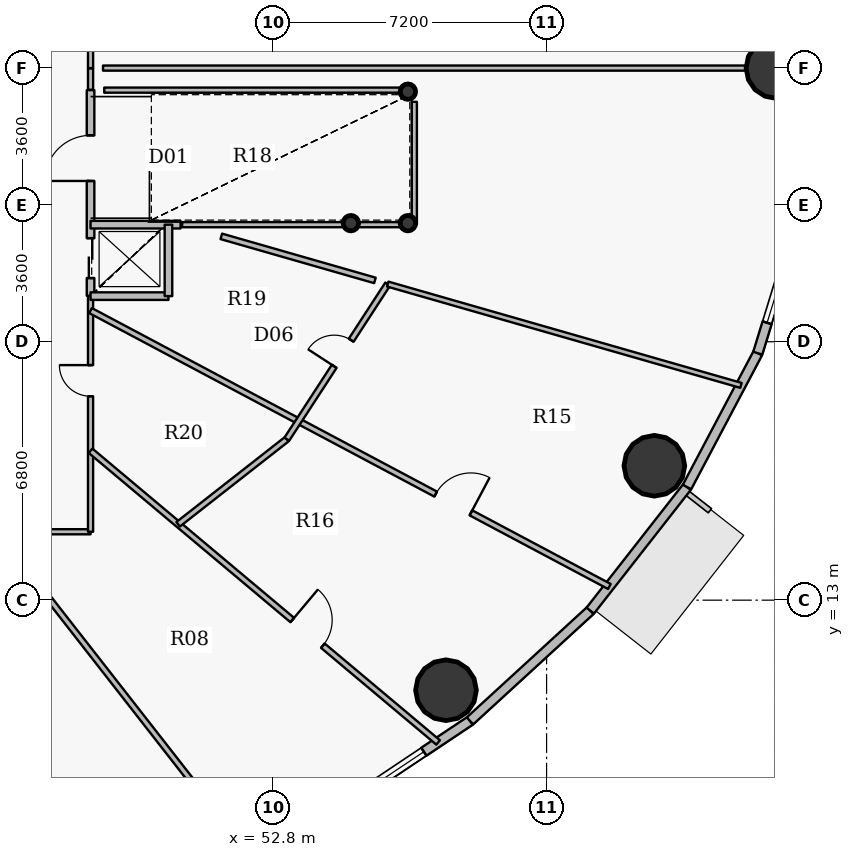
"""IFC4 building model, lengths in metres.
Left out: names, types, materials, properties, quantities, classifications, styles, units other than length and angle.
Written with IfcOpenShell. Run it as: python <this file> out.ifc"""

import sys

from ifc_helpers import new_model, si_unit, direction, frame, frame_2d, origin, origin_2d, place, context, subcontext, project, spatial, rectangle, hollow_circle, extrude, source, transform, mapped, element, fill, save


model = new_model("IFC4")
c1 = context("Model", 3, precision=1e-05, world=origin(), true_north=direction((0.0, 1.0)))
c2 = subcontext(c1, "Body", "Model", "MODEL_VIEW")
j1 = project(units=[si_unit("LENGTHUNIT", "METRE"), si_unit("PLANEANGLEUNIT", "RADIAN")], contexts=[c1])
p1 = place(None, origin())
s1 = spatial("IfcSite", under=j1, at=p1, CompositionType="ELEMENT")
p2 = place(p1, origin())
s2 = spatial("IfcBuilding", under=s1, at=p2, CompositionType="ELEMENT")
p3 = place(p2, frame((0.0, 0.0, 57.6)))
s3 = spatial("IfcBuildingStorey", under=s2, at=p3, CompositionType="ELEMENT", Elevation=57.6)
for number, where, z_axis, x_axis in (
    (1, (56.35, 26.38, 0.0), (0.0, 0.0, 1.0), (1.0, 0.0, 0.0)),
    (2, (56.35, 22.92, 0.0), (0.0, 0.0, 1.0), (1.0, 0.0, 0.0)),
    (3, (54.85, 22.92, 0.0), (0.0, 0.0, 1.0), (1.0, 0.0, 0.0)),
):
    element("IfcColumn", number, at=place(p3, frame(where, z_axis=z_axis, x_axis=x_axis)), inside=s3, PredefinedType="COLUMN", context=c2, shape_type="SweptSolid", body=[
        extrude(hollow_circle(Radius=0.203, WallThickness=0.016, at=origin_2d()), origin(), (0.0, 0.0, 1.0), 4.2),
    ])
for number, where, z_axis, x_axis in (
    (4, (66.05, 27.0, 0.0), (0.0, 0.0, 1.0), (1.0, 0.0, 0.0)),
    (5, (57.353, 10.631, 0.0), (0.0, 0.0, 1.0), (1.0, 0.0, 0.0)),
    (6, (62.835, 16.536, 0.0), (0.0, 0.0, 1.0), (1.0, 0.0, 0.0)),
):
    element("IfcColumn", number, at=place(p3, frame(where, z_axis=z_axis, x_axis=x_axis)), inside=s3, PredefinedType="COLUMN", context=c2, shape_type="SweptSolid", body=[
        extrude(hollow_circle(Radius=0.8, WallThickness=0.045, at=origin_2d()), origin(), (0.0, 0.0, 1.0), 4.2),
    ])
p4 = place(p3, frame((57.985, 9.824, 0.0), z_axis=(0.0, 0.0, 1.0), x_axis=(-0.831240982525, -0.555912249343, 0.0)))
e7 = element("IfcWall", 7, at=p4, inside=s3, PredefinedType="SOLIDWALL", context=c2, shape_type="SweptSolid", body=[
    extrude(rectangle(XDim=4.46, YDim=0.25, at=frame_2d((2.23, 0.0))), origin(), (0.0, 0.0, 1.0), 3.95),
])
p5 = place(p4, frame((1.461, 0.0, 0.9)))
e8 = element("IfcOpeningElement", 8, at=p5, cuts=e7, PredefinedType="OPENING", context=c2, shape_type="SweptSolid", body=[
    extrude(rectangle(XDim=2.2, YDim=2.0, at=origin_2d()), frame((1.1, 0.135, 1.0), z_axis=(0.0, -1.0, 0.0), x_axis=(1.0, 0.0, 0.0)), (0.0, 0.0, 1.0), 0.27),
])
p6 = place(p3, frame((61.15, 12.725, 0.0), z_axis=(0.0, 0.0, 1.0), x_axis=(-0.737116376281, -0.67576582321, 0.0)))
e9 = element("IfcWall", 9, at=p6, inside=s3, PredefinedType="SOLIDWALL", context=c2, shape_type="SweptSolid", body=[
    extrude(rectangle(XDim=4.294, YDim=0.25, at=frame_2d((2.147, 0.0))), origin(), (0.0, 0.0, 1.0), 3.95),
])
p7 = place(p3, frame((63.695, 15.977, 0.0), z_axis=(0.0, 0.0, 1.0), x_axis=(-0.616295508253, -0.787514981767, 0.0)))
e10 = element("IfcWall", 10, at=p7, inside=s3, PredefinedType="SOLIDWALL", context=c2, shape_type="SweptSolid", body=[
    extrude(rectangle(XDim=4.129, YDim=0.25, at=frame_2d((2.065, 0.0))), origin(), (0.0, 0.0, 1.0), 3.95),
])
p8 = place(p3, frame((65.558, 19.499, 0.0), z_axis=(0.0, 0.0, 1.0), x_axis=(-0.467662443071, -0.883907144072, 0.0)))
e11 = element("IfcWall", 11, at=p8, inside=s3, PredefinedType="SOLIDWALL", context=c2, shape_type="SweptSolid", body=[
    extrude(rectangle(XDim=3.984, YDim=0.25, at=frame_2d((1.992, 0.0))), origin(), (0.0, 0.0, 1.0), 3.95),
])
p9 = place(p3, frame((66.693, 23.203, 0.0), z_axis=(0.0, 0.0, 1.0), x_axis=(-0.293111631758, -0.956078224482, 0.0)))
e12 = element("IfcWall", 12, at=p9, inside=s3, PredefinedType="SOLIDWALL", context=c2, shape_type="SweptSolid", body=[
    extrude(rectangle(XDim=3.875, YDim=0.25, at=frame_2d((1.938, 0.0))), origin(), (0.0, 0.0, 1.0), 3.95),
])
p10 = place(p9, frame((0.837, 0.0, 0.9)))
e13 = element("IfcOpeningElement", 13, at=p10, cuts=e12, PredefinedType="OPENING", context=c2, shape_type="SweptSolid", body=[
    extrude(rectangle(XDim=2.2, YDim=2.0, at=origin_2d()), frame((1.1, 0.135, 1.0), z_axis=(0.0, -1.0, 0.0), x_axis=(1.0, 0.0, 0.0)), (0.0, 0.0, 1.0), 0.27),
])
p11 = place(p3, frame((39.828, 19.8, 0.0), z_axis=(0.0, 0.0, 1.0), x_axis=(0.469475400737, -0.882945552174, 0.0)))
e14 = element("IfcWall", 14, at=p11, inside=s3, PredefinedType="MOVABLE", context=c2, shape_type="SweptSolid", body=[
    extrude(rectangle(XDim=17.188, YDim=0.11, at=frame_2d((8.594, 0.0))), origin(), (0.0, 0.0, 1.0), 3.335),
])
p12 = place(p11, frame((8.069, 0.0, 0.0)))
e15 = element("IfcOpeningElement", 15, at=p12, cuts=e14, PredefinedType="OPENING", context=c2, shape_type="SweptSolid", body=[
    extrude(rectangle(XDim=1.05, YDim=2.15, at=origin_2d()), frame((0.525, 0.065, 1.075), z_axis=(0.0, -1.0, 0.0), x_axis=(1.0, 0.0, 0.0)), (0.0, 0.0, 1.0), 0.13),
])
p13 = place(p3, frame((41.625, 19.8, 0.0), z_axis=(0.0, 0.0, 1.0), x_axis=(0.615654567116, -0.788016150843, 0.0)))
e16 = element("IfcWall", 16, at=p13, inside=s3, PredefinedType="PARTITIONING", context=c2, shape_type="SweptSolid", body=[
    extrude(rectangle(XDim=17.105, YDim=0.15, at=frame_2d((8.552, 0.0))), origin(), (0.0, 0.0, 1.0), 3.335),
])
p14 = place(p3, frame((46.05, 14.8, 0.0), z_axis=(0.0, 0.0, 1.0), x_axis=(1.0, 0.0, 0.0)))
e17 = element("IfcWall", 17, at=p14, inside=s3, PredefinedType="PARTITIONING", context=c2, shape_type="SweptSolid", body=[
    extrude(rectangle(XDim=1.95, YDim=0.135, at=frame_2d((0.975, 0.0))), origin(), (0.0, 0.0, 1.0), 3.95),
])
p15 = place(p3, frame((48.0, 14.8, 0.0), z_axis=(0.0, 0.0, 1.0), x_axis=(0.0, 1.0, 0.0)))
e18 = element("IfcWall", 18, at=p15, inside=s3, PredefinedType="PARTITIONING", context=c2, shape_type="SweptSolid", body=[
    extrude(rectangle(XDim=6.2, YDim=0.135, at=frame_2d((3.1, 0.0))), origin(), (0.0, 0.0, 1.0), 3.285),
])
p16 = place(p15, frame((3.565, 0.0, 0.0)))
e19 = element("IfcOpeningElement", 19, at=p16, cuts=e18, PredefinedType="OPENING", context=c2, shape_type="SweptSolid", body=[
    extrude(rectangle(XDim=0.82, YDim=2.1, at=origin_2d()), frame((0.41, 0.078, 1.05), z_axis=(0.0, -1.0, 0.0), x_axis=(1.0, 0.0, 0.0)), (0.0, 0.0, 1.0), 0.155),
])
p17 = place(p3, frame((48.0, 16.931, 0.0), z_axis=(0.0, 0.0, 1.0), x_axis=(0.766041142181, -0.642791543571, 0.0)))
e20 = element("IfcWall", 20, at=p17, inside=s3, PredefinedType="PARTITIONING", context=c2, shape_type="SweptSolid", body=[
    extrude(rectangle(XDim=11.939, YDim=0.15, at=frame_2d((5.969, 0.0))), origin(), (0.0, 0.0, 1.0), 3.335),
])
p18 = place(p17, frame((6.929, 0.0, 0.0)))
e21 = element("IfcOpeningElement", 21, at=p18, cuts=e20, PredefinedType="OPENING", context=c2, shape_type="SweptSolid", body=[
    extrude(rectangle(XDim=1.05, YDim=2.15, at=origin_2d()), frame((0.525, 0.085, 1.075), z_axis=(0.0, -1.0, 0.0), x_axis=(1.0, 0.0, 0.0)), (0.0, 0.0, 1.0), 0.17),
])
p19 = place(p3, frame((48.0, 20.619, 0.0), z_axis=(0.0, 0.0, 1.0), x_axis=(0.882949260716, -0.469468425989, 0.0)))
e22 = element("IfcWall", 22, at=p19, inside=s3, PredefinedType="PARTITIONING", context=c2, shape_type="SweptSolid", body=[
    extrude(rectangle(XDim=15.463, YDim=0.15, at=frame_2d((7.731, 0.0))), origin(), (0.0, 0.0, 1.0), 3.335),
])
p20 = place(p19, frame((10.285, 0.0, 0.0)))
e23 = element("IfcOpeningElement", 23, at=p20, cuts=e22, PredefinedType="OPENING", context=c2, shape_type="SweptSolid", body=[
    extrude(rectangle(XDim=1.05, YDim=2.15, at=origin_2d()), frame((0.525, 0.085, 1.075), z_axis=(0.0, -1.0, 0.0), x_axis=(1.0, 0.0, 0.0)), (0.0, 0.0, 1.0), 0.17),
])
p21 = place(p3, frame((48.0, 21.01, 0.0), z_axis=(0.0, 0.0, 1.0), x_axis=(0.0, 1.0, 0.0)))
e24 = element("IfcWall", 24, at=p21, inside=s3, PredefinedType="PARTITIONING", context=c2, shape_type="SweptSolid", body=[
    extrude(rectangle(XDim=5.41, YDim=0.2, at=frame_2d((2.705, 0.0))), origin(), (0.0, 0.0, 1.0), 3.285),
])
p22 = place(p21, frame((3.02, 0.0, 0.0)))
e25 = element("IfcOpeningElement", 25, at=p22, cuts=e24, PredefinedType="OPENING", context=c2, shape_type="SweptSolid", body=[
    extrude(rectangle(XDim=1.2, YDim=2.15, at=origin_2d()), frame((0.6, 0.11, 1.075), z_axis=(0.0, -1.0, 0.0), x_axis=(1.0, 0.0, 0.0)), (0.0, 0.0, 1.0), 0.22),
])
p23 = place(p21, frame((0.465, 0.0, 0.0)))
e26 = element("IfcOpeningElement", 26, at=p23, cuts=e24, PredefinedType="OPENING", context=c2, shape_type="SweptSolid", body=[
    extrude(rectangle(XDim=1.05, YDim=2.15, at=origin_2d()), frame((0.525, 0.11, 1.075), z_axis=(0.0, -1.0, 0.0), x_axis=(1.0, 0.0, 0.0)), (0.0, 0.0, 1.0), 0.22),
])
p24 = place(p3, frame((48.0, 21.0, 0.0), z_axis=(0.0, 0.0, 1.0), x_axis=(1.0, 0.0, 0.0)))
e27 = element("IfcWall", 27, at=p24, inside=s3, PredefinedType="PARTITIONING", context=c2, shape_type="SweptSolid", body=[
    extrude(rectangle(XDim=2.05, YDim=0.2, at=frame_2d((1.025, 0.0))), origin(), (0.0, 0.0, 1.0), 3.95),
])
p25 = place(p3, frame((48.0, 22.88, 0.0), z_axis=(0.0, 0.0, 1.0), x_axis=(1.0, 0.0, 0.0)))
e28 = element("IfcWall", 28, at=p25, inside=s3, PredefinedType="PARTITIONING", context=c2, shape_type="SweptSolid", body=[
    extrude(rectangle(XDim=2.368, YDim=0.2, at=frame_2d((1.184, 0.0))), origin(), (0.0, 0.0, 1.0), 3.95),
])
p26 = place(p3, frame((48.0, 27.0, 0.0), z_axis=(0.0, 0.0, 1.0), x_axis=(0.0, 1.0, 0.0)))
e29 = element("IfcWall", 29, at=p26, inside=s3, PredefinedType="PARTITIONING", context=c2, shape_type="SweptSolid", body=[
    extrude(rectangle(XDim=14.2, YDim=0.135, at=frame_2d((7.1, 0.0))), origin(), (0.0, 0.0, 1.0), 3.285),
])
p27 = place(p26, frame((3.542, 0.0, 0.0)))
e30 = element("IfcOpeningElement", 30, at=p27, cuts=e29, PredefinedType="OPENING", context=c2, shape_type="SweptSolid", body=[
    extrude(rectangle(XDim=1.05, YDim=2.15, at=origin_2d()), frame((0.525, 0.078, 1.075), z_axis=(0.0, -1.0, 0.0), x_axis=(1.0, 0.0, 0.0)), (0.0, 0.0, 1.0), 0.155),
])
p28 = place(p26, frame((10.602, 0.0, 0.0)))
e31 = element("IfcOpeningElement", 31, at=p28, cuts=e29, PredefinedType="OPENING", context=c2, shape_type="SweptSolid", body=[
    extrude(rectangle(XDim=1.05, YDim=2.15, at=origin_2d()), frame((0.525, 0.078, 1.075), z_axis=(0.0, -1.0, 0.0), x_axis=(1.0, 0.0, 0.0)), (0.0, 0.0, 1.0), 0.155),
])
p29 = place(p3, frame((50.05, 21.0, 0.0), z_axis=(0.0, 0.0, 1.0), x_axis=(0.0, 1.0, 0.0)))
e32 = element("IfcWall", 32, at=p29, inside=s3, PredefinedType="PARTITIONING", context=c2, shape_type="SweptSolid", body=[
    extrude(rectangle(XDim=1.88, YDim=0.2, at=frame_2d((0.94, 0.0))), origin(), (0.0, 0.0, 1.0), 3.285),
])
p30 = place(p3, frame((50.305, 14.997, 0.0), z_axis=(0.0, 0.0, 1.0), x_axis=(0.787346078754, 0.616511275056, 0.0)))
e33 = element("IfcWall", 33, at=p30, inside=s3, PredefinedType="PARTITIONING", context=c2, shape_type="SweptSolid", body=[
    extrude(rectangle(XDim=3.631, YDim=0.15, at=frame_2d((1.816, 0.0))), origin(), (0.0, 0.0, 1.0), 3.285),
])
p31 = place(p3, frame((53.164, 17.236, 0.0), z_axis=(0.0, 0.0, 1.0), x_axis=(0.545409482698, 0.838169729937, 0.0)))
e34 = element("IfcWall", 34, at=p31, inside=s3, PredefinedType="PARTITIONING", context=c2, shape_type="SweptSolid", body=[
    extrude(rectangle(XDim=4.869, YDim=0.15, at=frame_2d((2.435, 0.0))), origin(), (0.0, 0.0, 1.0), 3.285),
])
p32 = place(p31, frame((2.288, 0.0, 0.0)))
e35 = element("IfcOpeningElement", 35, at=p32, cuts=e34, PredefinedType="OPENING", context=c2, shape_type="SweptSolid", body=[
    extrude(rectangle(XDim=0.82, YDim=2.1, at=origin_2d()), frame((0.41, 0.085, 1.05), z_axis=(0.0, -1.0, 0.0), x_axis=(1.0, 0.0, 0.0)), (0.0, 0.0, 1.0), 0.17),
])
p33 = place(p3, frame((48.36, 26.42, 0.0), z_axis=(0.0, 0.0, 1.0), x_axis=(1.0, 0.0, 0.0)))
e36 = element("IfcWall", 36, at=p33, inside=s3, PredefinedType="PARTITIONING", context=c2, shape_type="SweptSolid", body=[
    extrude(rectangle(XDim=8.16, YDim=0.135, at=frame_2d((4.08, 0.0))), origin(), (0.0, 0.0, 1.0), 3.95),
])
p34 = place(p3, frame((56.52, 26.113, 0.0), z_axis=(0.0, 0.0, 1.0), x_axis=(0.0, -1.0, 0.0)))
e37 = element("IfcWall", 37, at=p34, inside=s3, PredefinedType="PARTITIONING", context=c2, shape_type="SweptSolid", body=[
    extrude(rectangle(XDim=3.233, YDim=0.135, at=frame_2d((1.616, 0.0))), origin(), (0.0, 0.0, 1.0), 3.95),
])
p35 = place(p3, frame((56.212, 22.88, 0.0), z_axis=(0.0, 0.0, 1.0), x_axis=(-1.0, 0.0, 0.0)))
e38 = element("IfcWall", 38, at=p35, inside=s3, PredefinedType="PARTITIONING", context=c2, shape_type="SweptSolid", body=[
    extrude(rectangle(XDim=5.802, YDim=0.135, at=frame_2d((2.901, 0.0))), origin(), (0.0, 0.0, 1.0), 3.95),
])
p36 = place(p3, frame((48.0, 26.99, 0.0), z_axis=(0.0, 0.0, 1.0), x_axis=(0.0, -1.0, 0.0)))
e39 = element("IfcWall", 39, at=p36, inside=s3, PredefinedType="PARTITIONING", context=c2, shape_type="SweptSolid", body=[
    extrude(rectangle(XDim=0.56, YDim=0.135, at=frame_2d((0.28, 0.0))), origin(), (0.0, 0.0, 1.0), 3.285),
])
p37 = place(p3, frame((67.08, 27.0, 0.0), z_axis=(0.0, 0.0, 1.0), x_axis=(-1.0, 0.0, 0.0)))
e40 = element("IfcWall", 40, at=p37, inside=s3, PredefinedType="PARTITIONING", context=c2, shape_type="SweptSolid", body=[
    extrude(rectangle(XDim=18.753, YDim=0.135, at=frame_2d((9.376, 0.0))), origin(), (0.0, 0.0, 1.0), 3.285),
])
p38 = place(p3, frame((51.44, 22.573, 0.0), z_axis=(0.0, 0.0, 1.0), x_axis=(0.961265031159, -0.275625724255, 0.0)))
e41 = element("IfcWall", 41, at=p38, inside=s3, PredefinedType="PARTITIONING", context=c2, shape_type="SweptSolid", body=[
    extrude(rectangle(XDim=4.206, YDim=0.15, at=frame_2d((2.103, 0.0))), origin(), (0.0, 0.0, 1.0), 3.95),
])
p39 = place(p3, frame((55.82, 21.317, 0.0), z_axis=(0.0, 0.0, 1.0), x_axis=(0.961261497428, -0.275638048104, 0.0)))
e42 = element("IfcWall", 42, at=p39, inside=s3, PredefinedType="PARTITIONING", context=c2, shape_type="SweptSolid", body=[
    extrude(rectangle(XDim=9.669, YDim=0.135, at=frame_2d((4.835, 0.0))), origin(), (0.0, 0.0, 1.0), 3.335),
])
m1 = source(origin(), c2, "Body", "SweptSolid", [
    extrude(rectangle(XDim=2.2, YDim=2.0, at=origin_2d()), frame((1.1, 0.03, 1.0), z_axis=(0.0, -1.0, 0.0), x_axis=(1.0, 0.0, 0.0)), (0.0, 0.0, 1.0), 0.06),
])
p40 = place(p5, origin())
e43 = element("IfcWindow", 43, at=p40, inside=s3, PartitioningType="TRIPLE_PANEL_VERTICAL", PredefinedType="WINDOW", context=c2, shape_type="MappedRepresentation", body=[
    mapped(m1, transform((0.0, 0.0, 0.0), x_axis=(1.0, 0.0, 0.0), y_axis=(0.0, 1.0, 0.0), z_axis=(0.0, 0.0, 1.0), scale=1.0)),
])
fill(e8, e43)
p41 = place(p10, origin())
e44 = element("IfcWindow", 44, at=p41, inside=s3, PartitioningType="TRIPLE_PANEL_VERTICAL", PredefinedType="WINDOW", context=c2, shape_type="MappedRepresentation", body=[
    mapped(m1, transform((0.0, 0.0, 0.0), x_axis=(1.0, 0.0, 0.0), y_axis=(0.0, 1.0, 0.0), z_axis=(0.0, 0.0, 1.0), scale=1.0)),
])
fill(e13, e44)
m2 = source(origin(), c2, "Body", "SweptSolid", [
    extrude(rectangle(XDim=1.2, YDim=2.15, at=origin_2d()), frame((0.6, 0.025, 1.075), z_axis=(0.0, -1.0, 0.0), x_axis=(1.0, 0.0, 0.0)), (0.0, 0.0, 1.0), 0.05),
])
p42 = place(p22, origin())
e45 = element("IfcDoor", 45, at=p42, inside=s3, OperationType="SINGLE_SWING_LEFT", PredefinedType="DOOR", context=c2, shape_type="MappedRepresentation", body=[
    mapped(m2, transform((0.0, 0.0, 0.0), x_axis=(1.0, 0.0, 0.0), y_axis=(0.0, 1.0, 0.0), z_axis=(0.0, 0.0, 1.0), scale=1.0)),
])
fill(e25, e45)
m3 = source(origin(), c2, "Body", "SweptSolid", [
    extrude(rectangle(XDim=1.05, YDim=2.15, at=origin_2d()), frame((0.525, 0.025, 1.075), z_axis=(0.0, -1.0, 0.0), x_axis=(1.0, 0.0, 0.0)), (0.0, 0.0, 1.0), 0.05),
])
p43 = place(p23, origin())
e46 = element("IfcDoor", 46, at=p43, inside=s3, OperationType="DOUBLE_DOOR_SLIDING", PredefinedType="USERDEFINED", context=c2, shape_type="MappedRepresentation", body=[
    mapped(m3, transform((0.0, 0.0, 0.0), x_axis=(1.0, 0.0, 0.0), y_axis=(0.0, 1.0, 0.0), z_axis=(0.0, 0.0, 1.0), scale=1.0)),
])
fill(e26, e46)
m4 = source(origin(), c2, "Body", "SweptSolid", [
    extrude(rectangle(XDim=0.82, YDim=2.1, at=origin_2d()), frame((0.41, 0.025, 1.05), z_axis=(0.0, -1.0, 0.0), x_axis=(1.0, 0.0, 0.0)), (0.0, 0.0, 1.0), 0.05),
])
p44 = place(p16, origin())
e47 = element("IfcDoor", 47, at=p44, inside=s3, OperationType="SINGLE_SWING_RIGHT", PredefinedType="DOOR", context=c2, shape_type="MappedRepresentation", body=[
    mapped(m4, transform((0.0, 0.0, 0.0), x_axis=(1.0, 0.0, 0.0), y_axis=(0.0, 1.0, 0.0), z_axis=(0.0, 0.0, 1.0), scale=1.0)),
])
fill(e19, e47)
m5 = source(origin(), c2, "Body", "SweptSolid", [
    extrude(rectangle(XDim=1.05, YDim=2.15, at=origin_2d()), frame((0.525, 0.025, 1.075), z_axis=(0.0, -1.0, 0.0), x_axis=(1.0, 0.0, 0.0)), (0.0, 0.0, 1.0), 0.05),
])
p45 = place(p18, origin())
e48 = element("IfcDoor", 48, at=p45, inside=s3, OperationType="SINGLE_SWING_LEFT", PredefinedType="DOOR", context=c2, shape_type="MappedRepresentation", body=[
    mapped(m5, transform((0.0, 0.0, 0.0), x_axis=(1.0, 0.0, 0.0), y_axis=(0.0, 1.0, 0.0), z_axis=(0.0, 0.0, 1.0), scale=1.0)),
])
fill(e21, e48)
p46 = place(p20, origin())
e49 = element("IfcDoor", 49, at=p46, inside=s3, OperationType="SINGLE_SWING_RIGHT", PredefinedType="DOOR", context=c2, shape_type="MappedRepresentation", body=[
    mapped(m5, transform((0.0, 0.0, 0.0), x_axis=(1.0, 0.0, 0.0), y_axis=(0.0, 1.0, 0.0), z_axis=(0.0, 0.0, 1.0), scale=1.0)),
])
fill(e23, e49)
p47 = place(p32, origin())
e50 = element("IfcDoor", 50, at=p47, inside=s3, OperationType="SINGLE_SWING_LEFT", PredefinedType="DOOR", context=c2, shape_type="MappedRepresentation", body=[
    mapped(m4, transform((0.0, 0.0, 0.0), x_axis=(1.0, 0.0, 0.0), y_axis=(0.0, 1.0, 0.0), z_axis=(0.0, 0.0, 1.0), scale=1.0)),
])
fill(e35, e50)
save(model, sys.argv[1])
